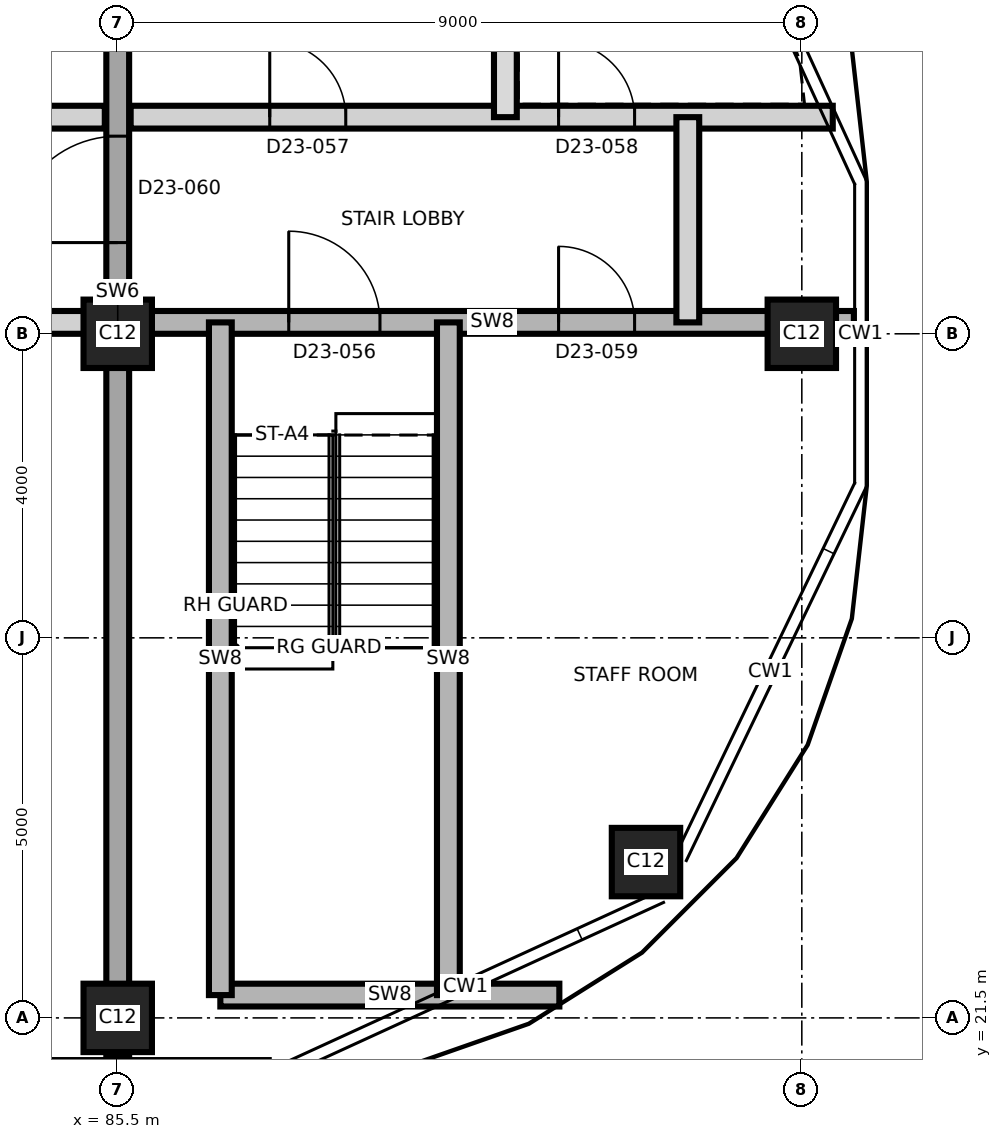
"""IFC4 building model, lengths in metres.
Left out: names, types, materials, properties, quantities, classifications, styles, units other than length and angle.
Written with IfcOpenShell. Run it as: python <this file> out.ifc"""

import sys

from ifc_helpers import new_model, si_unit, direction, frame, frame_2d, origin, origin_2d, place, context, subcontext, project, spatial, rectangle, extrude, element, fill, save


model = new_model("IFC4")
c1 = context("Model", 3, precision=1e-05, world=origin(), true_north=direction((0.0, 1.0)))
c2 = subcontext(c1, "Body", "Model", "MODEL_VIEW")
j1 = project(units=[si_unit("LENGTHUNIT", "METRE"), si_unit("PLANEANGLEUNIT", "RADIAN")], contexts=[c1])
p1 = place(None, origin())
s1 = spatial("IfcSite", under=j1, at=p1, CompositionType="ELEMENT")
p2 = place(p1, origin())
s2 = spatial("IfcBuilding", under=s1, at=p2, CompositionType="ELEMENT")
p3 = place(p2, frame((0.0, 0.0, 206.9)))
s3 = spatial("IfcBuildingStorey", under=s2, at=p3, CompositionType="ELEMENT", Elevation=206.9)
for number, where, z_axis, x_axis in (
    (1, (85.5, 21.5, 0.0), (0.0, 0.0, 1.0), (1.0, 0.0, 0.0)),
    (2, (92.45, 23.55, 0.0), (0.0, 0.0, 1.0), (1.0, 0.0, 0.0)),
    (3, (85.5, 30.5, 0.0), (0.0, 0.0, 1.0), (1.0, 0.0, 0.0)),
    (4, (94.5, 30.5, 0.0), (0.0, 0.0, 1.0), (1.0, 0.0, 0.0)),
):
    element("IfcColumn", number, at=place(p3, frame(where, z_axis=z_axis, x_axis=x_axis)), inside=s3, PredefinedType="COLUMN", context=c2, shape_type="SweptSolid", body=[
        extrude(rectangle(XDim=0.9, YDim=0.9, at=origin_2d()), origin(), (0.0, 0.0, 1.0), 3.7),
    ])
p4 = place(p3, frame((85.5, 20.995, 0.0), z_axis=(0.0, 0.0, 1.0), x_axis=(0.0, 1.0, 0.0)))
e5 = element("IfcWall", 5, at=p4, inside=s3, PredefinedType="SHEAR", context=c2, shape_type="SweptSolid", body=[
    extrude(rectangle(XDim=19.01, YDim=0.3, at=frame_2d((9.505, 0.0))), origin(), (0.0, 0.0, 1.0), 3.7),
])
p5 = place(p4, frame((10.705, 0.0, 0.0)))
e6 = element("IfcOpeningElement", 6, at=p5, cuts=e5, PredefinedType="OPENING", context=c2, shape_type="SweptSolid", body=[
    extrude(rectangle(XDim=1.4, YDim=2.1, at=frame_2d((0.7, 1.05))), frame((0.0, 0.16, 0.0), z_axis=(0.0, -1.0, 0.0), x_axis=(1.0, 0.0, 0.0)), (0.0, 0.0, 1.0), 0.32),
])
p6 = place(p3, frame((86.85, 21.8, 0.0), z_axis=(0.0, 0.0, 1.0), x_axis=(1.0, 0.0, 0.0)))
e7 = element("IfcWall", 7, at=p6, inside=s3, PredefinedType="SHEAR", context=c2, shape_type="SweptSolid", body=[
    extrude(rectangle(XDim=4.46, YDim=0.3, at=frame_2d((2.23, 0.0))), origin(), (0.0, 0.0, 1.0), 3.4),
])
p7 = place(p3, frame((58.55, 30.65, 0.0), z_axis=(0.0, 0.0, 1.0), x_axis=(1.0, 0.0, 0.0)))
e8 = element("IfcWall", 8, at=p7, inside=s3, PredefinedType="PARTITIONING", context=c2, shape_type="SweptSolid", body=[
    extrude(rectangle(XDim=26.78, YDim=0.3, at=frame_2d((13.39, 0.0))), origin(), (0.0, 0.0, 1.0), 3.4),
])
p8 = place(p7, frame((3.365, 0.0, 0.0)))
e9 = element("IfcOpeningElement", 9, at=p8, cuts=e8, PredefinedType="OPENING", context=c2, shape_type="SweptSolid", body=[
    extrude(rectangle(XDim=1.0, YDim=2.1, at=frame_2d((0.5, 1.05))), frame((0.0, 0.16, 0.0), z_axis=(0.0, -1.0, 0.0), x_axis=(1.0, 0.0, 0.0)), (0.0, 0.0, 1.0), 0.32),
])
p9 = place(p7, frame((6.315, 0.0, 0.0)))
e10 = element("IfcOpeningElement", 10, at=p9, cuts=e8, PredefinedType="OPENING", context=c2, shape_type="SweptSolid", body=[
    extrude(rectangle(XDim=1.4, YDim=2.1, at=frame_2d((0.7, 1.05))), frame((0.0, 0.16, 0.0), z_axis=(0.0, -1.0, 0.0), x_axis=(1.0, 0.0, 0.0)), (0.0, 0.0, 1.0), 0.32),
])
p10 = place(p7, frame((10.1, 0.0, 0.0)))
e11 = element("IfcOpeningElement", 11, at=p10, cuts=e8, PredefinedType="OPENING", context=c2, shape_type="SweptSolid", body=[
    extrude(rectangle(XDim=1.0, YDim=2.1, at=frame_2d((0.5, 1.05))), frame((0.0, 0.16, 0.0), z_axis=(0.0, -1.0, 0.0), x_axis=(1.0, 0.0, 0.0)), (0.0, 0.0, 1.0), 0.32),
])
p11 = place(p7, frame((15.95, 0.0, 0.0)))
e12 = element("IfcOpeningElement", 12, at=p11, cuts=e8, PredefinedType="OPENING", context=c2, shape_type="SweptSolid", body=[
    extrude(rectangle(XDim=1.0, YDim=2.1, at=frame_2d((0.5, 1.05))), frame((0.0, 0.16, 0.0), z_axis=(0.0, -1.0, 0.0), x_axis=(1.0, 0.0, 0.0)), (0.0, 0.0, 1.0), 0.32),
])
p12 = place(p7, frame((19.1, 0.0, 0.0)))
e13 = element("IfcOpeningElement", 13, at=p12, cuts=e8, PredefinedType="OPENING", context=c2, shape_type="SweptSolid", body=[
    extrude(rectangle(XDim=1.0, YDim=2.1, at=frame_2d((0.5, 1.05))), frame((0.0, 0.16, 0.0), z_axis=(0.0, -1.0, 0.0), x_axis=(1.0, 0.0, 0.0)), (0.0, 0.0, 1.0), 0.32),
])
p13 = place(p7, frame((24.95, 0.0, 0.0)))
e14 = element("IfcOpeningElement", 14, at=p13, cuts=e8, PredefinedType="OPENING", context=c2, shape_type="SweptSolid", body=[
    extrude(rectangle(XDim=1.0, YDim=2.1, at=frame_2d((0.5, 1.05))), frame((0.0, 0.16, 0.0), z_axis=(0.0, -1.0, 0.0), x_axis=(1.0, 0.0, 0.0)), (0.0, 0.0, 1.0), 0.32),
])
p14 = place(p3, frame((85.67, 30.65, 0.0), z_axis=(0.0, 0.0, 1.0), x_axis=(1.0, 0.0, 0.0)))
e15 = element("IfcWall", 15, at=p14, inside=s3, PredefinedType="SHEAR", context=c2, shape_type="SweptSolid", body=[
    extrude(rectangle(XDim=9.515, YDim=0.3, at=frame_2d((4.758, 0.0))), origin(), (0.0, 0.0, 1.0), 3.4),
])
p15 = place(p14, frame((2.08, 0.0, 0.0)))
e16 = element("IfcOpeningElement", 16, at=p15, cuts=e15, PredefinedType="OPENING", context=c2, shape_type="SweptSolid", body=[
    extrude(rectangle(XDim=1.2, YDim=2.1, at=frame_2d((0.6, 1.05))), frame((0.0, 0.16, 0.0), z_axis=(0.0, -1.0, 0.0), x_axis=(1.0, 0.0, 0.0)), (0.0, 0.0, 1.0), 0.32),
])
p16 = place(p14, frame((5.63, 0.0, 0.0)))
e17 = element("IfcOpeningElement", 17, at=p16, cuts=e15, PredefinedType="OPENING", context=c2, shape_type="SweptSolid", body=[
    extrude(rectangle(XDim=1.0, YDim=2.1, at=frame_2d((0.5, 1.05))), frame((0.0, 0.16, 0.0), z_axis=(0.0, -1.0, 0.0), x_axis=(1.0, 0.0, 0.0)), (0.0, 0.0, 1.0), 0.32),
])
p17 = place(p3, frame((58.55, 33.35, 0.0), z_axis=(0.0, 0.0, 1.0), x_axis=(1.0, 0.0, 0.0)))
e18 = element("IfcWall", 18, at=p17, inside=s3, PredefinedType="PARTITIONING", context=c2, shape_type="SweptSolid", body=[
    extrude(rectangle(XDim=26.78, YDim=0.3, at=frame_2d((13.39, 0.0))), origin(), (0.0, 0.0, 1.0), 3.4),
])
p18 = place(p17, frame((3.365, 0.0, 0.0)))
e19 = element("IfcOpeningElement", 19, at=p18, cuts=e18, PredefinedType="OPENING", context=c2, shape_type="SweptSolid", body=[
    extrude(rectangle(XDim=1.0, YDim=2.1, at=frame_2d((0.5, 1.05))), frame((0.0, 0.16, 0.0), z_axis=(0.0, -1.0, 0.0), x_axis=(1.0, 0.0, 0.0)), (0.0, 0.0, 1.0), 0.32),
])
p19 = place(p17, frame((6.315, 0.0, 0.0)))
e20 = element("IfcOpeningElement", 20, at=p19, cuts=e18, PredefinedType="OPENING", context=c2, shape_type="SweptSolid", body=[
    extrude(rectangle(XDim=1.4, YDim=2.1, at=frame_2d((0.7, 1.05))), frame((0.0, 0.16, 0.0), z_axis=(0.0, -1.0, 0.0), x_axis=(1.0, 0.0, 0.0)), (0.0, 0.0, 1.0), 0.32),
])
p20 = place(p17, frame((10.65, 0.0, 0.0)))
e21 = element("IfcOpeningElement", 21, at=p20, cuts=e18, PredefinedType="OPENING", context=c2, shape_type="SweptSolid", body=[
    extrude(rectangle(XDim=1.2, YDim=2.1, at=frame_2d((0.6, 1.05))), frame((0.0, 0.16, 0.0), z_axis=(0.0, -1.0, 0.0), x_axis=(1.0, 0.0, 0.0)), (0.0, 0.0, 1.0), 0.32),
])
p21 = place(p17, frame((13.9, 0.0, 0.0)))
e22 = element("IfcOpeningElement", 22, at=p21, cuts=e18, PredefinedType="OPENING", context=c2, shape_type="SweptSolid", body=[
    extrude(rectangle(XDim=1.0, YDim=2.1, at=frame_2d((0.5, 1.05))), frame((0.0, 0.16, 0.0), z_axis=(0.0, -1.0, 0.0), x_axis=(1.0, 0.0, 0.0)), (0.0, 0.0, 1.0), 0.32),
])
p22 = place(p17, frame((19.085, 0.0, 0.0)))
e23 = element("IfcOpeningElement", 23, at=p22, cuts=e18, PredefinedType="OPENING", context=c2, shape_type="SweptSolid", body=[
    extrude(rectangle(XDim=1.2, YDim=2.1, at=frame_2d((0.6, 1.05))), frame((0.0, 0.16, 0.0), z_axis=(0.0, -1.0, 0.0), x_axis=(1.0, 0.0, 0.0)), (0.0, 0.0, 1.0), 0.32),
])
p23 = place(p17, frame((22.335, 0.0, 0.0)))
e24 = element("IfcOpeningElement", 24, at=p23, cuts=e18, PredefinedType="OPENING", context=c2, shape_type="SweptSolid", body=[
    extrude(rectangle(XDim=1.0, YDim=2.1, at=frame_2d((0.5, 1.05))), frame((0.0, 0.16, 0.0), z_axis=(0.0, -1.0, 0.0), x_axis=(1.0, 0.0, 0.0)), (0.0, 0.0, 1.0), 0.32),
])
p24 = place(p3, frame((85.67, 33.35, 0.0), z_axis=(0.0, 0.0, 1.0), x_axis=(1.0, 0.0, 0.0)))
e25 = element("IfcWall", 25, at=p24, inside=s3, PredefinedType="PARTITIONING", context=c2, shape_type="SweptSolid", body=[
    extrude(rectangle(XDim=9.237, YDim=0.3, at=frame_2d((4.619, 0.0))), origin(), (0.0, 0.0, 1.0), 3.4),
])
p25 = place(p24, frame((1.83, 0.0, 0.0)))
e26 = element("IfcOpeningElement", 26, at=p25, cuts=e25, PredefinedType="OPENING", context=c2, shape_type="SweptSolid", body=[
    extrude(rectangle(XDim=1.0, YDim=2.1, at=frame_2d((0.5, 1.05))), frame((0.0, 0.16, 0.0), z_axis=(0.0, -1.0, 0.0), x_axis=(1.0, 0.0, 0.0)), (0.0, 0.0, 1.0), 0.32),
])
p26 = place(p24, frame((5.63, 0.0, 0.0)))
e27 = element("IfcOpeningElement", 27, at=p26, cuts=e25, PredefinedType="OPENING", context=c2, shape_type="SweptSolid", body=[
    extrude(rectangle(XDim=1.0, YDim=2.1, at=frame_2d((0.5, 1.05))), frame((0.0, 0.16, 0.0), z_axis=(0.0, -1.0, 0.0), x_axis=(1.0, 0.0, 0.0)), (0.0, 0.0, 1.0), 0.32),
])
for number, where, z_axis, x_axis in (
    (28, (86.85, 21.8, 0.0), (0.0, 0.0, 1.0), (0.0, 1.0, 0.0)),
    (29, (89.85, 21.8, 0.0), (0.0, 0.0, 1.0), (0.0, 1.0, 0.0)),
):
    element("IfcWall", number, at=place(p3, frame(where, z_axis=z_axis, x_axis=x_axis)), inside=s3, PredefinedType="SHEAR", context=c2, shape_type="SweptSolid", body=[
        extrude(rectangle(XDim=8.85, YDim=0.3, at=frame_2d((4.425, 0.0))), origin(), (0.0, 0.0, 1.0), 3.4),
    ])
p27 = place(p3, frame((90.6, 33.35, 0.0), z_axis=(0.0, 0.0, 1.0), x_axis=(0.0, 1.0, 0.0)))
e30 = element("IfcWall", 30, at=p27, inside=s3, PredefinedType="PARTITIONING", context=c2, shape_type="SweptSolid", body=[
    extrude(rectangle(XDim=6.219, YDim=0.3, at=frame_2d((3.109, 0.0))), origin(), (0.0, 0.0, 1.0), 3.4),
])
p28 = place(p3, frame((93.0, 30.65, 0.0), z_axis=(0.0, 0.0, 1.0), x_axis=(0.0, 1.0, 0.0)))
e31 = element("IfcWall", 31, at=p28, inside=s3, PredefinedType="PARTITIONING", context=c2, shape_type="SweptSolid", body=[
    extrude(rectangle(XDim=2.7, YDim=0.3, at=frame_2d((1.35, 0.0))), origin(), (0.0, 0.0, 1.0), 3.4),
])
p29 = place(p15, origin())
e32 = element("IfcDoor", 32, at=p29, inside=s3, OperationType="SINGLE_SWING_LEFT", PredefinedType="DOOR", context=c2, shape_type="SweptSolid", body=[
    extrude(rectangle(XDim=1.2, YDim=2.1, at=frame_2d((0.6, 1.05))), frame((0.0, 0.025, 0.0), z_axis=(0.0, -1.0, 0.0), x_axis=(1.0, 0.0, 0.0)), (0.0, 0.0, 1.0), 0.05),
])
fill(e16, e32)
p30 = place(p25, origin())
e33 = element("IfcDoor", 33, at=p30, inside=s3, OperationType="SINGLE_SWING_LEFT", PredefinedType="DOOR", context=c2, shape_type="SweptSolid", body=[
    extrude(rectangle(XDim=1.0, YDim=2.1, at=frame_2d((0.5, 1.05))), frame((0.0, 0.025, 0.0), z_axis=(0.0, -1.0, 0.0), x_axis=(1.0, 0.0, 0.0)), (0.0, 0.0, 1.0), 0.05),
])
fill(e26, e33)
p31 = place(p26, origin())
e34 = element("IfcDoor", 34, at=p31, inside=s3, OperationType="SINGLE_SWING_RIGHT", PredefinedType="DOOR", context=c2, shape_type="SweptSolid", body=[
    extrude(rectangle(XDim=1.0, YDim=2.1, at=frame_2d((0.5, 1.05))), frame((0.0, 0.025, 0.0), z_axis=(0.0, -1.0, 0.0), x_axis=(1.0, 0.0, 0.0)), (0.0, 0.0, 1.0), 0.05),
])
fill(e27, e34)
p32 = place(p16, origin())
e35 = element("IfcDoor", 35, at=p32, inside=s3, OperationType="SINGLE_SWING_LEFT", PredefinedType="DOOR", context=c2, shape_type="SweptSolid", body=[
    extrude(rectangle(XDim=1.0, YDim=2.1, at=frame_2d((0.5, 1.05))), frame((0.0, 0.025, 0.0), z_axis=(0.0, -1.0, 0.0), x_axis=(1.0, 0.0, 0.0)), (0.0, 0.0, 1.0), 0.05),
])
fill(e17, e35)
p33 = place(p5, origin())
e36 = element("IfcDoor", 36, at=p33, inside=s3, OperationType="SINGLE_SWING_RIGHT", PredefinedType="DOOR", context=c2, shape_type="SweptSolid", body=[
    extrude(rectangle(XDim=1.4, YDim=2.1, at=frame_2d((0.7, 1.05))), frame((0.0, 0.025, 0.0), z_axis=(0.0, -1.0, 0.0), x_axis=(1.0, 0.0, 0.0)), (0.0, 0.0, 1.0), 0.05),
])
fill(e6, e36)
save(model, sys.argv[1])
